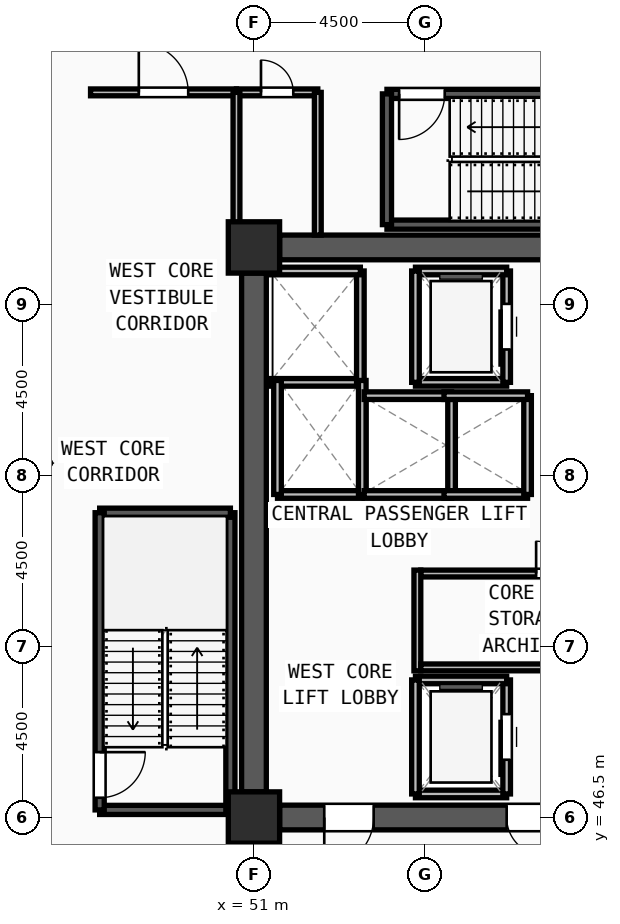
"""IFC4 building model, lengths in metres.
Left out: names, types, materials, properties, quantities, classifications, styles, units other than length and angle.
Written with IfcOpenShell. Run it as: python <this file> out.ifc"""

import sys

from ifc_helpers import new_model, si_unit, direction, frame, frame_2d, origin, origin_2d, place, context, subcontext, project, spatial, rectangle, extrude, source, transform, mapped, element, fill, save


model = new_model("IFC4")
c1 = context("Model", 3, precision=1e-05, world=origin(), true_north=direction((0.0, 1.0)))
c2 = subcontext(c1, "Body", "Model", "MODEL_VIEW")
j1 = project(units=[si_unit("LENGTHUNIT", "METRE"), si_unit("PLANEANGLEUNIT", "RADIAN")], contexts=[c1])
p1 = place(None, origin())
s1 = spatial("IfcSite", under=j1, at=p1, CompositionType="ELEMENT")
p2 = place(p1, origin())
s2 = spatial("IfcBuilding", under=s1, at=p2, CompositionType="ELEMENT")
p3 = place(p2, frame((0.0, 0.0, 194.25)))
s3 = spatial("IfcBuildingStorey", under=s2, at=p3, CompositionType="ELEMENT", Elevation=194.25)
m1 = source(origin(), c2, "Body", "SweptSolid", [
    extrude(rectangle(XDim=1.35, YDim=1.35, at=origin_2d()), origin(), (0.0, 0.0, 1.0), 3.75),
])
for number, where, z_axis, x_axis in (
    (1, (51.0, 46.5, 0.0), (0.0, 0.0, 1.0), (1.0, 0.0, 0.0)),
    (2, (51.0, 61.5, 0.0), (0.0, 0.0, 1.0), (1.0, 0.0, 0.0)),
):
    element("IfcColumn", number, at=place(p3, frame(where, z_axis=z_axis, x_axis=x_axis)), inside=s3, PredefinedType="COLUMN", context=c2, shape_type="MappedRepresentation", body=[
        mapped(m1, transform((0.0, 0.0, 0.0), x_axis=(1.0, 0.0, 0.0), y_axis=(0.0, 1.0, 0.0), z_axis=(0.0, 0.0, 1.0), scale=1.0)),
    ])
p4 = place(p3, frame((51.675, 61.5, 0.0), z_axis=(0.0, 0.0, 1.0), x_axis=(1.0, 0.0, 0.0)))
e3 = element("IfcWall", 3, at=p4, inside=s3, PredefinedType="SHEAR", context=c2, shape_type="SweptSolid", body=[
    extrude(rectangle(XDim=7.65, YDim=0.65, at=frame_2d((3.825, 0.0))), origin(), (0.0, 0.0, 1.0), 3.57),
])
p5 = place(p3, frame((59.325, 46.5, 0.0), z_axis=(0.0, 0.0, 1.0), x_axis=(-1.0, 0.0, 0.0)))
e4 = element("IfcWall", 4, at=p5, inside=s3, PredefinedType="SHEAR", context=c2, shape_type="SweptSolid", body=[
    extrude(rectangle(XDim=7.65, YDim=0.65, at=frame_2d((3.825, 0.0))), origin(), (0.0, 0.0, 1.0), 3.57),
])
m2 = source(origin(), c2, "Body", "SweptSolid", [
    extrude(rectangle(XDim=1.3, YDim=2.2, at=frame_2d((0.65, 1.1))), frame((0.0, 0.335, 0.0), z_axis=(0.0, -1.0, 0.0), x_axis=(1.0, 0.0, 0.0)), (0.0, 0.0, 1.0), 0.67),
])
p6 = place(p5, frame((5.175, 0.0, 0.0)))
e5 = element("IfcOpeningElement", 5, at=p6, cuts=e4, PredefinedType="OPENING", context=c2, shape_type="MappedRepresentation", body=[
    mapped(m2, transform((0.0, 0.0, 0.0), x_axis=(1.0, 0.0, 0.0), y_axis=(0.0, 1.0, 0.0), z_axis=(0.0, 0.0, 1.0), scale=1.0)),
])
m3 = source(origin(), c2, "Body", "SweptSolid", [
    extrude(rectangle(XDim=1.0, YDim=2.2, at=frame_2d((0.5, 1.1))), frame((0.0, 0.335, 0.0), z_axis=(0.0, -1.0, 0.0), x_axis=(1.0, 0.0, 0.0)), (0.0, 0.0, 1.0), 0.67),
])
p7 = place(p5, frame((0.675, 0.0, 0.0)))
e6 = element("IfcOpeningElement", 6, at=p7, cuts=e4, PredefinedType="OPENING", context=c2, shape_type="MappedRepresentation", body=[
    mapped(m3, transform((0.0, 0.0, 0.0), x_axis=(1.0, 0.0, 0.0), y_axis=(0.0, 1.0, 0.0), z_axis=(0.0, 0.0, 1.0), scale=1.0)),
])
p8 = place(p3, frame((51.0, 47.175, 0.0), z_axis=(0.0, 0.0, 1.0), x_axis=(0.0, 1.0, 0.0)))
e7 = element("IfcWall", 7, at=p8, inside=s3, PredefinedType="SHEAR", context=c2, shape_type="SweptSolid", body=[
    extrude(rectangle(XDim=13.65, YDim=0.65, at=frame_2d((6.825, 0.0))), origin(), (0.0, 0.0, 1.0), 3.57),
])
p9 = place(p3, frame((46.94, 46.7, 0.0), z_axis=(0.0, 0.0, 1.0), x_axis=(1.0, 0.0, 0.0)))
e8 = element("IfcWall", 8, at=p9, inside=s3, PredefinedType="SOLIDWALL", context=c2, shape_type="SweptSolid", body=[
    extrude(rectangle(XDim=3.44, YDim=0.24, at=frame_2d((1.72, 0.0))), origin(), (0.0, 0.0, 1.0), 3.57),
])
p10 = place(p3, frame((50.38, 46.7, 0.0), z_axis=(0.0, 0.0, 1.0), x_axis=(0.0, 1.0, 0.0)))
e9 = element("IfcWall", 9, at=p10, inside=s3, PredefinedType="SOLIDWALL", context=c2, shape_type="SweptSolid", body=[
    extrude(rectangle(XDim=7.82, YDim=0.24, at=frame_2d((3.91, 0.0))), origin(), (0.0, 0.0, 1.0), 3.57),
])
p11 = place(p3, frame((50.38, 54.52, 0.0), z_axis=(0.0, 0.0, 1.0), x_axis=(-1.0, 0.0, 0.0)))
e10 = element("IfcWall", 10, at=p11, inside=s3, PredefinedType="SOLIDWALL", context=c2, shape_type="SweptSolid", body=[
    extrude(rectangle(XDim=3.44, YDim=0.24, at=frame_2d((1.72, 0.0))), origin(), (0.0, 0.0, 1.0), 3.57),
])
p12 = place(p3, frame((46.94, 54.52, 0.0), z_axis=(0.0, 0.0, 1.0), x_axis=(0.0, -1.0, 0.0)))
e11 = element("IfcWall", 11, at=p12, inside=s3, PredefinedType="SOLIDWALL", context=c2, shape_type="SweptSolid", body=[
    extrude(rectangle(XDim=7.82, YDim=0.24, at=frame_2d((3.91, 0.0))), origin(), (0.0, 0.0, 1.0), 3.57),
])
m4 = source(origin(), c2, "Body", "SweptSolid", [
    extrude(rectangle(XDim=1.2, YDim=2.2, at=frame_2d((0.6, 1.1))), frame((0.0, 0.13, 0.0), z_axis=(0.0, -1.0, 0.0), x_axis=(1.0, 0.0, 0.0)), (0.0, 0.0, 1.0), 0.26),
])
p13 = place(p12, frame((6.3, 0.0, 0.0)))
e12 = element("IfcOpeningElement", 12, at=p13, cuts=e11, PredefinedType="OPENING", context=c2, shape_type="MappedRepresentation", body=[
    mapped(m4, transform((0.0, 0.0, 0.0), x_axis=(1.0, 0.0, 0.0), y_axis=(0.0, 1.0, 0.0), z_axis=(0.0, 0.0, 1.0), scale=1.0)),
])
p14 = place(p3, frame((54.5, 62.1, 0.0), z_axis=(0.0, 0.0, 1.0), x_axis=(1.0, 0.0, 0.0)))
e13 = element("IfcWall", 13, at=p14, inside=s3, PredefinedType="SOLIDWALL", context=c2, shape_type="SweptSolid", body=[
    extrude(rectangle(XDim=7.82, YDim=0.24, at=frame_2d((3.91, 0.0))), origin(), (0.0, 0.0, 1.0), 3.57),
])
p15 = place(p3, frame((62.32, 65.54, 0.0), z_axis=(0.0, 0.0, 1.0), x_axis=(-1.0, 0.0, 0.0)))
e14 = element("IfcWall", 14, at=p15, inside=s3, PredefinedType="SOLIDWALL", context=c2, shape_type="SweptSolid", body=[
    extrude(rectangle(XDim=7.82, YDim=0.24, at=frame_2d((3.91, 0.0))), origin(), (0.0, 0.0, 1.0), 3.57),
])
p16 = place(p15, frame((6.3, 0.0, 0.0)))
e15 = element("IfcOpeningElement", 15, at=p16, cuts=e14, PredefinedType="OPENING", context=c2, shape_type="MappedRepresentation", body=[
    mapped(m4, transform((0.0, 0.0, 0.0), x_axis=(1.0, 0.0, 0.0), y_axis=(0.0, 1.0, 0.0), z_axis=(0.0, 0.0, 1.0), scale=1.0)),
])
p17 = place(p3, frame((54.5, 65.54, 0.0), z_axis=(0.0, 0.0, 1.0), x_axis=(0.0, -1.0, 0.0)))
e16 = element("IfcWall", 16, at=p17, inside=s3, PredefinedType="SOLIDWALL", context=c2, shape_type="SweptSolid", body=[
    extrude(rectangle(XDim=3.44, YDim=0.24, at=frame_2d((1.72, 0.0))), origin(), (0.0, 0.0, 1.0), 3.57),
])
p18 = place(p3, frame((55.25, 47.12, 0.0), z_axis=(0.0, 0.0, 1.0), x_axis=(1.0, 0.0, 0.0)))
e17 = element("IfcWall", 17, at=p18, inside=s3, PredefinedType="SOLIDWALL", context=c2, shape_type="SweptSolid", body=[
    extrude(rectangle(XDim=2.4, YDim=0.2, at=frame_2d((1.2, 0.0))), origin(), (0.0, 0.0, 1.0), 3.57),
])
p19 = place(p3, frame((57.65, 47.12, 0.0), z_axis=(0.0, 0.0, 1.0), x_axis=(0.0, 1.0, 0.0)))
e18 = element("IfcWall", 18, at=p19, inside=s3, PredefinedType="SOLIDWALL", context=c2, shape_type="SweptSolid", body=[
    extrude(rectangle(XDim=3.0, YDim=0.2, at=frame_2d((1.5, 0.0))), origin(), (0.0, 0.0, 1.0), 3.57),
])
m5 = source(origin(), c2, "Body", "SweptSolid", [
    extrude(rectangle(XDim=1.2, YDim=2.3, at=frame_2d((0.6, 1.15))), frame((0.0, 0.11, 0.0), z_axis=(0.0, -1.0, 0.0), x_axis=(1.0, 0.0, 0.0)), (0.0, 0.0, 1.0), 0.22),
])
p20 = place(p19, frame((0.9, 0.0, 0.0)))
e19 = element("IfcOpeningElement", 19, at=p20, cuts=e18, PredefinedType="OPENING", context=c2, shape_type="MappedRepresentation", body=[
    mapped(m5, transform((0.0, 0.0, 0.0), x_axis=(1.0, 0.0, 0.0), y_axis=(0.0, 1.0, 0.0), z_axis=(0.0, 0.0, 1.0), scale=1.0)),
])
p21 = place(p3, frame((57.65, 50.12, 0.0), z_axis=(0.0, 0.0, 1.0), x_axis=(-1.0, 0.0, 0.0)))
e20 = element("IfcWall", 20, at=p21, inside=s3, PredefinedType="SOLIDWALL", context=c2, shape_type="SweptSolid", body=[
    extrude(rectangle(XDim=2.4, YDim=0.2, at=frame_2d((1.2, 0.0))), origin(), (0.0, 0.0, 1.0), 3.57),
])
p22 = place(p3, frame((55.25, 50.12, 0.0), z_axis=(0.0, 0.0, 1.0), x_axis=(0.0, -1.0, 0.0)))
e21 = element("IfcWall", 21, at=p22, inside=s3, PredefinedType="SOLIDWALL", context=c2, shape_type="SweptSolid", body=[
    extrude(rectangle(XDim=3.0, YDim=0.2, at=frame_2d((1.5, 0.0))), origin(), (0.0, 0.0, 1.0), 3.57),
])
p23 = place(p3, frame((55.25, 57.95, 0.0), z_axis=(0.0, 0.0, 1.0), x_axis=(1.0, 0.0, 0.0)))
e22 = element("IfcWall", 22, at=p23, inside=s3, PredefinedType="SOLIDWALL", context=c2, shape_type="SweptSolid", body=[
    extrude(rectangle(XDim=2.4, YDim=0.2, at=frame_2d((1.2, 0.0))), origin(), (0.0, 0.0, 1.0), 3.57),
])
p24 = place(p3, frame((57.65, 57.95, 0.0), z_axis=(0.0, 0.0, 1.0), x_axis=(0.0, 1.0, 0.0)))
e23 = element("IfcWall", 23, at=p24, inside=s3, PredefinedType="SOLIDWALL", context=c2, shape_type="SweptSolid", body=[
    extrude(rectangle(XDim=2.93, YDim=0.2, at=frame_2d((1.465, 0.0))), origin(), (0.0, 0.0, 1.0), 3.57),
])
p25 = place(p24, frame((0.865, 0.0, 0.0)))
e24 = element("IfcOpeningElement", 24, at=p25, cuts=e23, PredefinedType="OPENING", context=c2, shape_type="MappedRepresentation", body=[
    mapped(m5, transform((0.0, 0.0, 0.0), x_axis=(1.0, 0.0, 0.0), y_axis=(0.0, 1.0, 0.0), z_axis=(0.0, 0.0, 1.0), scale=1.0)),
])
p26 = place(p3, frame((57.65, 60.88, 0.0), z_axis=(0.0, 0.0, 1.0), x_axis=(-1.0, 0.0, 0.0)))
e25 = element("IfcWall", 25, at=p26, inside=s3, PredefinedType="SOLIDWALL", context=c2, shape_type="SweptSolid", body=[
    extrude(rectangle(XDim=2.4, YDim=0.2, at=frame_2d((1.2, 0.0))), origin(), (0.0, 0.0, 1.0), 3.57),
])
p27 = place(p3, frame((55.25, 60.88, 0.0), z_axis=(0.0, 0.0, 1.0), x_axis=(0.0, -1.0, 0.0)))
e26 = element("IfcWall", 26, at=p27, inside=s3, PredefinedType="SOLIDWALL", context=c2, shape_type="SweptSolid", body=[
    extrude(rectangle(XDim=2.93, YDim=0.2, at=frame_2d((1.465, 0.0))), origin(), (0.0, 0.0, 1.0), 3.57),
])
p28 = place(p3, frame((51.4, 57.95, 0.0), z_axis=(0.0, 0.0, 1.0), x_axis=(1.0, 0.0, 0.0)))
e27 = element("IfcWall", 27, at=p28, inside=s3, PredefinedType="SOLIDWALL", context=c2, shape_type="SweptSolid", body=[
    extrude(rectangle(XDim=2.4, YDim=0.2, at=frame_2d((1.2, 0.0))), origin(), (0.0, 0.0, 1.0), 3.57),
])
p29 = place(p3, frame((53.8, 57.95, 0.0), z_axis=(0.0, 0.0, 1.0), x_axis=(0.0, 1.0, 0.0)))
e28 = element("IfcWall", 28, at=p29, inside=s3, PredefinedType="SOLIDWALL", context=c2, shape_type="SweptSolid", body=[
    extrude(rectangle(XDim=2.93, YDim=0.2, at=frame_2d((1.465, 0.0))), origin(), (0.0, 0.0, 1.0), 3.57),
])
p30 = place(p3, frame((53.8, 60.88, 0.0), z_axis=(0.0, 0.0, 1.0), x_axis=(-1.0, 0.0, 0.0)))
e29 = element("IfcWall", 29, at=p30, inside=s3, PredefinedType="SOLIDWALL", context=c2, shape_type="SweptSolid", body=[
    extrude(rectangle(XDim=2.4, YDim=0.2, at=frame_2d((1.2, 0.0))), origin(), (0.0, 0.0, 1.0), 3.57),
])
p31 = place(p3, frame((51.62, 55.0, 0.0), z_axis=(0.0, 0.0, 1.0), x_axis=(1.0, 0.0, 0.0)))
e30 = element("IfcWall", 30, at=p31, inside=s3, PredefinedType="SOLIDWALL", context=c2, shape_type="SweptSolid", body=[
    extrude(rectangle(XDim=2.23, YDim=0.2, at=frame_2d((1.115, 0.0))), origin(), (0.0, 0.0, 1.0), 3.57),
])
for number, where, z_axis, x_axis in (
    (31, (53.85, 55.0, 0.0), (0.0, 0.0, 1.0), (0.0, 1.0, 0.0)),
    (32, (51.62, 58.0, 0.0), (0.0, 0.0, 1.0), (0.0, -1.0, 0.0)),
):
    element("IfcWall", number, at=place(p3, frame(where, z_axis=z_axis, x_axis=x_axis)), inside=s3, PredefinedType="SOLIDWALL", context=c2, shape_type="SweptSolid", body=[
        extrude(rectangle(XDim=3.0, YDim=0.2, at=frame_2d((1.5, 0.0))), origin(), (0.0, 0.0, 1.0), 3.57),
    ])
p32 = place(p3, frame((53.9, 55.0, 0.0), z_axis=(0.0, 0.0, 1.0), x_axis=(1.0, 0.0, 0.0)))
e33 = element("IfcWall", 33, at=p32, inside=s3, PredefinedType="SOLIDWALL", context=c2, shape_type="SweptSolid", body=[
    extrude(rectangle(XDim=2.3, YDim=0.2, at=frame_2d((1.15, 0.0))), origin(), (0.0, 0.0, 1.0), 3.57),
])
p33 = place(p3, frame((56.2, 55.0, 0.0), z_axis=(0.0, 0.0, 1.0), x_axis=(0.0, 1.0, 0.0)))
e34 = element("IfcWall", 34, at=p33, inside=s3, PredefinedType="SOLIDWALL", context=c2, shape_type="SweptSolid", body=[
    extrude(rectangle(XDim=2.6, YDim=0.2, at=frame_2d((1.3, 0.0))), origin(), (0.0, 0.0, 1.0), 3.57),
])
p34 = place(p3, frame((56.2, 57.6, 0.0), z_axis=(0.0, 0.0, 1.0), x_axis=(-1.0, 0.0, 0.0)))
e35 = element("IfcWall", 35, at=p34, inside=s3, PredefinedType="SOLIDWALL", context=c2, shape_type="SweptSolid", body=[
    extrude(rectangle(XDim=2.3, YDim=0.2, at=frame_2d((1.15, 0.0))), origin(), (0.0, 0.0, 1.0), 3.57),
])
p35 = place(p3, frame((56.0, 55.0, 0.0), z_axis=(0.0, 0.0, 1.0), x_axis=(1.0, 0.0, 0.0)))
e36 = element("IfcWall", 36, at=p35, inside=s3, PredefinedType="SOLIDWALL", context=c2, shape_type="SweptSolid", body=[
    extrude(rectangle(XDim=2.2, YDim=0.2, at=frame_2d((1.1, 0.0))), origin(), (0.0, 0.0, 1.0), 3.57),
])
p36 = place(p3, frame((58.2, 55.0, 0.0), z_axis=(0.0, 0.0, 1.0), x_axis=(0.0, 1.0, 0.0)))
e37 = element("IfcWall", 37, at=p36, inside=s3, PredefinedType="SOLIDWALL", context=c2, shape_type="SweptSolid", body=[
    extrude(rectangle(XDim=2.6, YDim=0.2, at=frame_2d((1.3, 0.0))), origin(), (0.0, 0.0, 1.0), 3.57),
])
p37 = place(p3, frame((58.2, 57.6, 0.0), z_axis=(0.0, 0.0, 1.0), x_axis=(-1.0, 0.0, 0.0)))
e38 = element("IfcWall", 38, at=p37, inside=s3, PredefinedType="SOLIDWALL", context=c2, shape_type="SweptSolid", body=[
    extrude(rectangle(XDim=2.2, YDim=0.2, at=frame_2d((1.1, 0.0))), origin(), (0.0, 0.0, 1.0), 3.57),
])
p38 = place(p3, frame((55.39, 52.92, 0.0), z_axis=(0.0, 0.0, 1.0), x_axis=(1.0, 0.0, 0.0)))
e39 = element("IfcWall", 39, at=p38, inside=s3, PredefinedType="PARTITIONING", context=c2, shape_type="SweptSolid", body=[
    extrude(rectangle(XDim=6.91, YDim=0.18, at=frame_2d((3.455, 0.0))), origin(), (0.0, 0.0, 1.0), 3.57),
])
m6 = source(origin(), c2, "Body", "SweptSolid", [
    extrude(rectangle(XDim=0.85, YDim=2.1, at=frame_2d((0.425, 1.05))), frame((0.0, 0.1, 0.0), z_axis=(0.0, -1.0, 0.0), x_axis=(1.0, 0.0, 0.0)), (0.0, 0.0, 1.0), 0.2),
])
p39 = place(p38, frame((3.035, 0.0, 0.0)))
e40 = element("IfcOpeningElement", 40, at=p39, cuts=e39, PredefinedType="OPENING", context=c2, shape_type="MappedRepresentation", body=[
    mapped(m6, transform((0.0, 0.0, 0.0), x_axis=(1.0, 0.0, 0.0), y_axis=(0.0, 1.0, 0.0), z_axis=(0.0, 0.0, 1.0), scale=1.0)),
])
p40 = place(p3, frame((50.54, 65.58, 0.0), z_axis=(0.0, 0.0, 1.0), x_axis=(1.0, 0.0, 0.0)))
e41 = element("IfcWall", 41, at=p40, inside=s3, PredefinedType="PARTITIONING", context=c2, shape_type="SweptSolid", body=[
    extrude(rectangle(XDim=2.14, YDim=0.18, at=frame_2d((1.07, 0.0))), origin(), (0.0, 0.0, 1.0), 3.57),
])
p41 = place(p40, frame((0.645, 0.0, 0.0)))
e42 = element("IfcOpeningElement", 42, at=p41, cuts=e41, PredefinedType="OPENING", context=c2, shape_type="MappedRepresentation", body=[
    mapped(m6, transform((0.0, 0.0, 0.0), x_axis=(1.0, 0.0, 0.0), y_axis=(0.0, 1.0, 0.0), z_axis=(0.0, 0.0, 1.0), scale=1.0)),
])
p42 = place(p3, frame((46.7, 65.58, 0.0), z_axis=(0.0, 0.0, 1.0), x_axis=(1.0, 0.0, 0.0)))
e43 = element("IfcWall", 43, at=p42, inside=s3, PredefinedType="PARTITIONING", context=c2, shape_type="SweptSolid", body=[
    extrude(rectangle(XDim=3.84, YDim=0.18, at=frame_2d((1.92, 0.0))), origin(), (0.0, 0.0, 1.0), 3.57),
])
m7 = source(origin(), c2, "Body", "SweptSolid", [
    extrude(rectangle(XDim=1.3, YDim=2.2, at=frame_2d((0.65, 1.1))), frame((0.0, 0.1, 0.0), z_axis=(0.0, -1.0, 0.0), x_axis=(1.0, 0.0, 0.0)), (0.0, 0.0, 1.0), 0.2),
])
p43 = place(p42, frame((1.27, 0.0, 0.0)))
e44 = element("IfcOpeningElement", 44, at=p43, cuts=e43, PredefinedType="OPENING", context=c2, shape_type="MappedRepresentation", body=[
    mapped(m7, transform((0.0, 0.0, 0.0), x_axis=(1.0, 0.0, 0.0), y_axis=(0.0, 1.0, 0.0), z_axis=(0.0, 0.0, 1.0), scale=1.0)),
])
p44 = place(p3, frame((50.54, 61.95, 0.0), z_axis=(0.0, 0.0, 1.0), x_axis=(0.0, 1.0, 0.0)))
e45 = element("IfcWall", 45, at=p44, inside=s3, PredefinedType="PARTITIONING", context=c2, shape_type="SweptSolid", body=[
    extrude(rectangle(XDim=3.63, YDim=0.18, at=frame_2d((1.815, 0.0))), origin(), (0.0, 0.0, 1.0), 3.57),
])
p45 = place(p3, frame((52.68, 61.825, 0.0), z_axis=(0.0, 0.0, 1.0), x_axis=(0.0, 1.0, 0.0)))
e46 = element("IfcWall", 46, at=p45, inside=s3, PredefinedType="PARTITIONING", context=c2, shape_type="SweptSolid", body=[
    extrude(rectangle(XDim=3.755, YDim=0.18, at=frame_2d((1.877, 0.0))), origin(), (0.0, 0.0, 1.0), 3.57),
])
p46 = place(p3, frame((55.3, 50.36, 0.0), z_axis=(0.0, 0.0, 1.0), x_axis=(0.0, 1.0, 0.0)))
e47 = element("IfcWall", 47, at=p46, inside=s3, PredefinedType="PARTITIONING", context=c2, shape_type="SweptSolid", body=[
    extrude(rectangle(XDim=2.65, YDim=0.18, at=frame_2d((1.325, 0.0))), origin(), (0.0, 0.0, 1.0), 3.57),
])
p47 = place(p3, frame((55.39, 50.45, 0.0), z_axis=(0.0, 0.0, 1.0), x_axis=(1.0, 0.0, 0.0)))
e48 = element("IfcWall", 48, at=p47, inside=s3, PredefinedType="PARTITIONING", context=c2, shape_type="SweptSolid", body=[
    extrude(rectangle(XDim=6.91, YDim=0.18, at=frame_2d((3.455, 0.0))), origin(), (0.0, 0.0, 1.0), 3.57),
])
m8 = source(origin(), c2, "Body", "SweptSolid", [
    extrude(rectangle(XDim=1.3, YDim=2.2, at=frame_2d((0.65, 1.1))), frame((0.0, 0.025, 0.0), z_axis=(0.0, -1.0, 0.0), x_axis=(1.0, 0.0, 0.0)), (0.0, 0.0, 1.0), 0.05),
])
p48 = place(p6, origin())
e49 = element("IfcDoor", 49, at=p48, inside=s3, OperationType="SINGLE_SWING_RIGHT", PredefinedType="DOOR", context=c2, shape_type="MappedRepresentation", body=[
    mapped(m8, transform((0.0, 0.0, 0.0), x_axis=(1.0, 0.0, 0.0), y_axis=(0.0, 1.0, 0.0), z_axis=(0.0, 0.0, 1.0), scale=1.0)),
])
fill(e5, e49)
m9 = source(origin(), c2, "Body", "SweptSolid", [
    extrude(rectangle(XDim=1.0, YDim=2.2, at=frame_2d((0.5, 1.1))), frame((0.0, 0.025, 0.0), z_axis=(0.0, -1.0, 0.0), x_axis=(1.0, 0.0, 0.0)), (0.0, 0.0, 1.0), 0.05),
])
p49 = place(p7, origin())
e50 = element("IfcDoor", 50, at=p49, inside=s3, OperationType="SINGLE_SWING_LEFT", PredefinedType="DOOR", context=c2, shape_type="MappedRepresentation", body=[
    mapped(m9, transform((0.0, 0.0, 0.0), x_axis=(1.0, 0.0, 0.0), y_axis=(0.0, 1.0, 0.0), z_axis=(0.0, 0.0, 1.0), scale=1.0)),
])
fill(e6, e50)
m10 = source(origin(), c2, "Body", "SweptSolid", [
    extrude(rectangle(XDim=1.2, YDim=2.2, at=frame_2d((0.6, 1.1))), frame((0.0, 0.025, 0.0), z_axis=(0.0, -1.0, 0.0), x_axis=(1.0, 0.0, 0.0)), (0.0, 0.0, 1.0), 0.05),
])
p50 = place(p13, origin())
e51 = element("IfcDoor", 51, at=p50, inside=s3, OperationType="SINGLE_SWING_LEFT", PredefinedType="DOOR", context=c2, shape_type="MappedRepresentation", body=[
    mapped(m10, transform((0.0, 0.0, 0.0), x_axis=(1.0, 0.0, 0.0), y_axis=(0.0, 1.0, 0.0), z_axis=(0.0, 0.0, 1.0), scale=1.0)),
])
fill(e12, e51)
p51 = place(p16, origin())
e52 = element("IfcDoor", 52, at=p51, inside=s3, OperationType="SINGLE_SWING_RIGHT", PredefinedType="DOOR", context=c2, shape_type="MappedRepresentation", body=[
    mapped(m10, transform((0.0, 0.0, 0.0), x_axis=(1.0, 0.0, 0.0), y_axis=(0.0, 1.0, 0.0), z_axis=(0.0, 0.0, 1.0), scale=1.0)),
])
fill(e15, e52)
m11 = source(origin(), c2, "Body", "SweptSolid", [
    extrude(rectangle(XDim=1.2, YDim=2.3, at=frame_2d((0.6, 1.15))), frame((0.0, 0.025, 0.0), z_axis=(0.0, -1.0, 0.0), x_axis=(1.0, 0.0, 0.0)), (0.0, 0.0, 1.0), 0.05),
])
p52 = place(p20, origin())
e53 = element("IfcDoor", 53, at=p52, inside=s3, OperationType="SLIDING_TO_LEFT", PredefinedType="DOOR", context=c2, shape_type="MappedRepresentation", body=[
    mapped(m11, transform((0.0, 0.0, 0.0), x_axis=(1.0, 0.0, 0.0), y_axis=(0.0, 1.0, 0.0), z_axis=(0.0, 0.0, 1.0), scale=1.0)),
])
fill(e19, e53)
p53 = place(p25, origin())
e54 = element("IfcDoor", 54, at=p53, inside=s3, OperationType="SLIDING_TO_LEFT", PredefinedType="DOOR", context=c2, shape_type="MappedRepresentation", body=[
    mapped(m11, transform((0.0, 0.0, 0.0), x_axis=(1.0, 0.0, 0.0), y_axis=(0.0, 1.0, 0.0), z_axis=(0.0, 0.0, 1.0), scale=1.0)),
])
fill(e24, e54)
m12 = source(origin(), c2, "Body", "SweptSolid", [
    extrude(rectangle(XDim=0.85, YDim=2.1, at=frame_2d((0.425, 1.05))), frame((0.0, 0.025, 0.0), z_axis=(0.0, -1.0, 0.0), x_axis=(1.0, 0.0, 0.0)), (0.0, 0.0, 1.0), 0.05),
])
p54 = place(p39, origin())
e55 = element("IfcDoor", 55, at=p54, inside=s3, OperationType="SINGLE_SWING_LEFT", PredefinedType="DOOR", context=c2, shape_type="MappedRepresentation", body=[
    mapped(m12, transform((0.0, 0.0, 0.0), x_axis=(1.0, 0.0, 0.0), y_axis=(0.0, 1.0, 0.0), z_axis=(0.0, 0.0, 1.0), scale=1.0)),
])
fill(e40, e55)
p55 = place(p41, origin())
e56 = element("IfcDoor", 56, at=p55, inside=s3, OperationType="SINGLE_SWING_LEFT", PredefinedType="DOOR", context=c2, shape_type="MappedRepresentation", body=[
    mapped(m12, transform((0.0, 0.0, 0.0), x_axis=(1.0, 0.0, 0.0), y_axis=(0.0, 1.0, 0.0), z_axis=(0.0, 0.0, 1.0), scale=1.0)),
])
fill(e42, e56)
p56 = place(p43, origin())
e57 = element("IfcDoor", 57, at=p56, inside=s3, OperationType="SINGLE_SWING_LEFT", PredefinedType="DOOR", context=c2, shape_type="MappedRepresentation", body=[
    mapped(m8, transform((0.0, 0.0, 0.0), x_axis=(1.0, 0.0, 0.0), y_axis=(0.0, 1.0, 0.0), z_axis=(0.0, 0.0, 1.0), scale=1.0)),
])
fill(e44, e57)
save(model, sys.argv[1])
